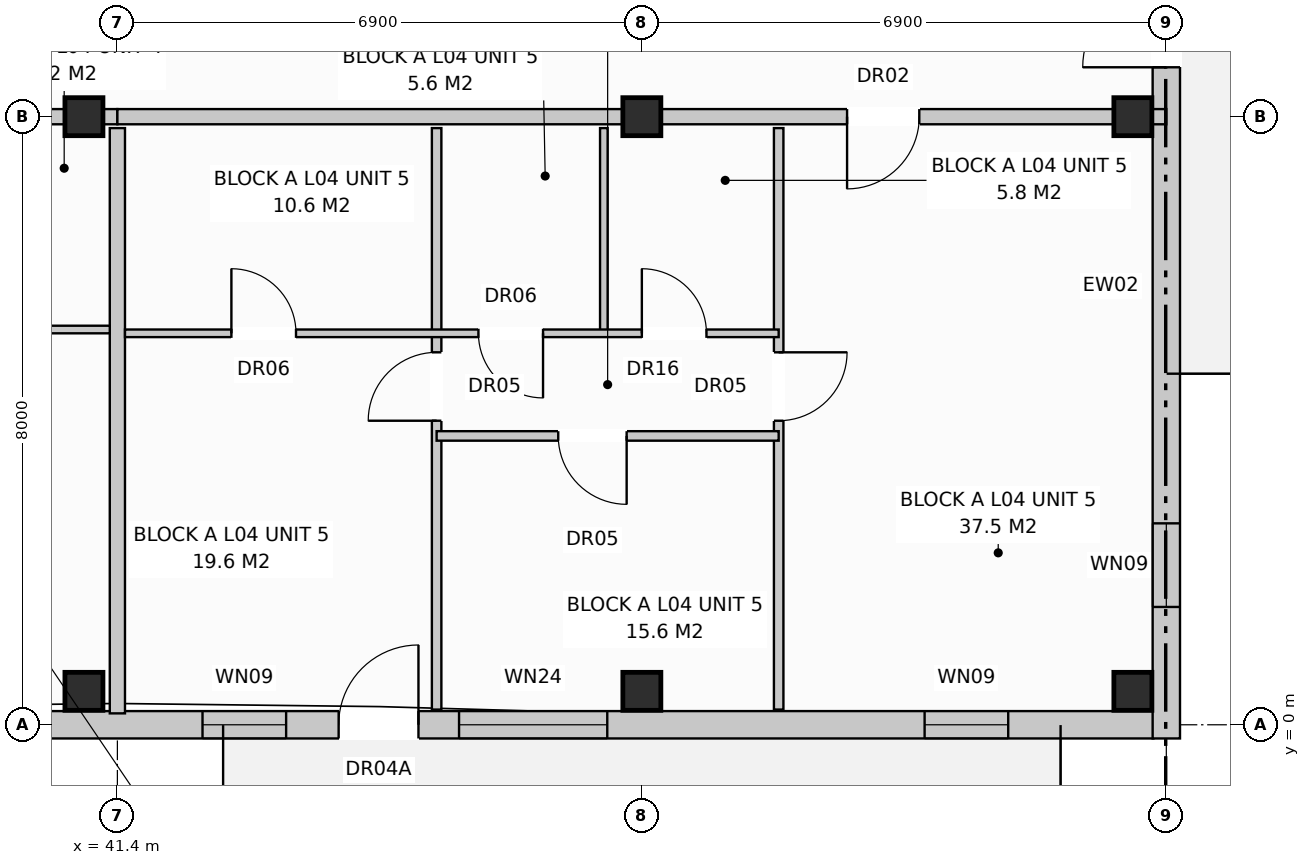
"""IFC4 building model, lengths in metres.
Left out: names, types, materials, properties, quantities, classifications, styles, units other than length and angle.
Written with IfcOpenShell. Run it as: python <this file> out.ifc"""

import sys

from ifc_helpers import new_model, si_unit, direction, frame, frame_2d, origin, origin_with_axes, origin_2d, place, context, subcontext, project, spatial, rectangle, extrude, element, fill, save


model = new_model("IFC4")
c1 = context("Model", 3, precision=1e-05, world=origin(), true_north=direction((0.0, 1.0)))
c2 = subcontext(c1, "Body", "Model", "MODEL_VIEW")
j1 = project(units=[si_unit("LENGTHUNIT", "METRE"), si_unit("PLANEANGLEUNIT", "RADIAN")], contexts=[c1])
p1 = place(None, origin())
s1 = spatial("IfcSite", under=j1, at=p1, CompositionType="ELEMENT")
p2 = place(p1, origin())
s2 = spatial("IfcBuilding", under=s1, at=p2, CompositionType="ELEMENT")
p3 = place(p2, frame((0.0, 0.0, 14.4)))
s3 = spatial("IfcBuildingStorey", under=s2, at=p3, CompositionType="ELEMENT", Elevation=14.4)
for number, where, z_axis, x_axis in (
    (1, (40.96, 0.44, 0.0), (0.0, 0.0, 1.0), (1.0, 0.0, 0.0)),
    (2, (40.96, 8.0, 0.0), (0.0, 0.0, 1.0), (1.0, 0.0, 0.0)),
    (3, (48.3, 0.44, 0.0), (0.0, 0.0, 1.0), (1.0, 0.0, 0.0)),
    (4, (48.3, 8.0, 0.0), (0.0, 0.0, 1.0), (1.0, 0.0, 0.0)),
    (5, (54.76, 0.44, 0.0), (0.0, 0.0, 1.0), (1.0, 0.0, 0.0)),
    (6, (54.76, 8.0, 0.0), (0.0, 0.0, 1.0), (1.0, 0.0, 0.0)),
):
    element("IfcColumn", number, at=place(p3, frame(where, z_axis=z_axis, x_axis=x_axis)), inside=s3, PredefinedType="COLUMN", context=c2, shape_type="SweptSolid", body=[
        extrude(rectangle(XDim=0.5, YDim=0.5, at=origin_2d()), origin(), (0.0, 0.0, 1.0), 3.2),
    ])
p4 = place(p3, frame((0.17, 0.0, 0.0), z_axis=(0.0, 0.0, 1.0), x_axis=(1.0, 0.0, 0.0)))
e7 = element("IfcWall", 7, at=p4, inside=s3, PredefinedType="STANDARD", context=c2, shape_type="SweptSolid", body=[
    extrude(rectangle(XDim=54.86, YDim=0.36, at=frame_2d((27.43, 0.0))), origin(), (0.0, 0.0, 1.0), 2.94),
])
p5 = place(p4, frame((2.485, 0.0, 0.0)))
e8 = element("IfcOpeningElement", 8, at=p5, cuts=e7, PredefinedType="OPENING", context=c2, shape_type="SweptSolid", body=[
    extrude(rectangle(XDim=1.05, YDim=2.12, at=frame_2d((0.525, 1.06))), frame((0.0, 0.192, 0.0), z_axis=(0.0, -1.0, 0.0), x_axis=(1.0, 0.0, 0.0)), (0.0, 0.0, 1.0), 0.384),
])
p6 = place(p4, frame((16.985, 0.0, 0.0)))
e9 = element("IfcOpeningElement", 9, at=p6, cuts=e7, PredefinedType="OPENING", context=c2, shape_type="SweptSolid", body=[
    extrude(rectangle(XDim=1.05, YDim=2.12, at=frame_2d((0.525, 1.06))), frame((0.0, 0.192, 0.0), z_axis=(0.0, -1.0, 0.0), x_axis=(1.0, 0.0, 0.0)), (0.0, 0.0, 1.0), 0.384),
])
p7 = place(p4, frame((30.085, 0.0, 0.0)))
e10 = element("IfcOpeningElement", 10, at=p7, cuts=e7, PredefinedType="OPENING", context=c2, shape_type="SweptSolid", body=[
    extrude(rectangle(XDim=1.05, YDim=2.12, at=frame_2d((0.525, 1.06))), frame((0.0, 0.192, 0.0), z_axis=(0.0, -1.0, 0.0), x_axis=(1.0, 0.0, 0.0)), (0.0, 0.0, 1.0), 0.384),
])
p8 = place(p4, frame((44.141, 0.0, 0.0)))
e11 = element("IfcOpeningElement", 11, at=p8, cuts=e7, PredefinedType="OPENING", context=c2, shape_type="SweptSolid", body=[
    extrude(rectangle(XDim=1.05, YDim=2.12, at=frame_2d((0.525, 1.06))), frame((0.0, 0.192, 0.0), z_axis=(0.0, -1.0, 0.0), x_axis=(1.0, 0.0, 0.0)), (0.0, 0.0, 1.0), 0.384),
])
p9 = place(p4, frame((0.75, 0.0, 0.72)))
e12 = element("IfcOpeningElement", 12, at=p9, cuts=e7, PredefinedType="OPENING", context=c2, shape_type="SweptSolid", body=[
    extrude(rectangle(XDim=1.1, YDim=1.5, at=frame_2d((0.55, 0.75))), frame((0.0, 0.192, 0.0), z_axis=(0.0, -1.0, 0.0), x_axis=(1.0, 0.0, 0.0)), (0.0, 0.0, 1.0), 0.384),
])
p10 = place(p4, frame((4.25, 0.0, 0.72)))
e13 = element("IfcOpeningElement", 13, at=p10, cuts=e7, PredefinedType="OPENING", context=c2, shape_type="SweptSolid", body=[
    extrude(rectangle(XDim=1.9, YDim=1.85, at=frame_2d((0.95, 0.925))), frame((0.0, 0.192, 0.0), z_axis=(0.0, -1.0, 0.0), x_axis=(1.0, 0.0, 0.0)), (0.0, 0.0, 1.0), 0.384),
])
p11 = place(p4, frame((8.925, 0.0, 0.8)))
e14 = element("IfcOpeningElement", 14, at=p11, cuts=e7, PredefinedType="OPENING", context=c2, shape_type="SweptSolid", body=[
    extrude(rectangle(XDim=1.95, YDim=1.65, at=frame_2d((0.975, 0.825))), frame((0.0, 0.192, 0.0), z_axis=(0.0, -1.0, 0.0), x_axis=(1.0, 0.0, 0.0)), (0.0, 0.0, 1.0), 0.384),
])
p12 = place(p4, frame((15.05, 0.0, 0.72)))
e15 = element("IfcOpeningElement", 15, at=p12, cuts=e7, PredefinedType="OPENING", context=c2, shape_type="SweptSolid", body=[
    extrude(rectangle(XDim=1.1, YDim=1.5, at=frame_2d((0.55, 0.75))), frame((0.0, 0.192, 0.0), z_axis=(0.0, -1.0, 0.0), x_axis=(1.0, 0.0, 0.0)), (0.0, 0.0, 1.0), 0.384),
])
p13 = place(p4, frame((21.05, 0.0, 0.72)))
e16 = element("IfcOpeningElement", 16, at=p13, cuts=e7, PredefinedType="OPENING", context=c2, shape_type="SweptSolid", body=[
    extrude(rectangle(XDim=1.9, YDim=1.85, at=frame_2d((0.95, 0.925))), frame((0.0, 0.192, 0.0), z_axis=(0.0, -1.0, 0.0), x_axis=(1.0, 0.0, 0.0)), (0.0, 0.0, 1.0), 0.384),
])
p14 = place(p4, frame((24.85, 0.0, 0.72)))
e17 = element("IfcOpeningElement", 17, at=p14, cuts=e7, PredefinedType="OPENING", context=c2, shape_type="SweptSolid", body=[
    extrude(rectangle(XDim=1.1, YDim=1.5, at=frame_2d((0.55, 0.75))), frame((0.0, 0.192, 0.0), z_axis=(0.0, -1.0, 0.0), x_axis=(1.0, 0.0, 0.0)), (0.0, 0.0, 1.0), 0.384),
])
p15 = place(p4, frame((28.35, 0.0, 0.72)))
e18 = element("IfcOpeningElement", 18, at=p15, cuts=e7, PredefinedType="OPENING", context=c2, shape_type="SweptSolid", body=[
    extrude(rectangle(XDim=1.1, YDim=1.5, at=frame_2d((0.55, 0.75))), frame((0.0, 0.192, 0.0), z_axis=(0.0, -1.0, 0.0), x_axis=(1.0, 0.0, 0.0)), (0.0, 0.0, 1.0), 0.384),
])
p16 = place(p4, frame((31.85, 0.0, 0.72)))
e19 = element("IfcOpeningElement", 19, at=p16, cuts=e7, PredefinedType="OPENING", context=c2, shape_type="SweptSolid", body=[
    extrude(rectangle(XDim=1.9, YDim=1.85, at=frame_2d((0.95, 0.925))), frame((0.0, 0.192, 0.0), z_axis=(0.0, -1.0, 0.0), x_axis=(1.0, 0.0, 0.0)), (0.0, 0.0, 1.0), 0.384),
])
p17 = place(p4, frame((35.525, 0.0, 0.8)))
e20 = element("IfcOpeningElement", 20, at=p17, cuts=e7, PredefinedType="OPENING", context=c2, shape_type="SweptSolid", body=[
    extrude(rectangle(XDim=1.95, YDim=1.65, at=frame_2d((0.975, 0.825))), frame((0.0, 0.192, 0.0), z_axis=(0.0, -1.0, 0.0), x_axis=(1.0, 0.0, 0.0)), (0.0, 0.0, 1.0), 0.384),
])
p18 = place(p4, frame((39.25, 0.0, 0.72)))
e21 = element("IfcOpeningElement", 21, at=p18, cuts=e7, PredefinedType="OPENING", context=c2, shape_type="SweptSolid", body=[
    extrude(rectangle(XDim=1.1, YDim=1.5, at=frame_2d((0.55, 0.75))), frame((0.0, 0.192, 0.0), z_axis=(0.0, -1.0, 0.0), x_axis=(1.0, 0.0, 0.0)), (0.0, 0.0, 1.0), 0.384),
])
p19 = place(p4, frame((42.35, 0.0, 0.72)))
e22 = element("IfcOpeningElement", 22, at=p19, cuts=e7, PredefinedType="OPENING", context=c2, shape_type="SweptSolid", body=[
    extrude(rectangle(XDim=1.1, YDim=1.5, at=frame_2d((0.55, 0.75))), frame((0.0, 0.192, 0.0), z_axis=(0.0, -1.0, 0.0), x_axis=(1.0, 0.0, 0.0)), (0.0, 0.0, 1.0), 0.384),
])
p20 = place(p4, frame((45.725, 0.0, 0.8)))
e23 = element("IfcOpeningElement", 23, at=p20, cuts=e7, PredefinedType="OPENING", context=c2, shape_type="SweptSolid", body=[
    extrude(rectangle(XDim=1.95, YDim=1.65, at=frame_2d((0.975, 0.825))), frame((0.0, 0.192, 0.0), z_axis=(0.0, -1.0, 0.0), x_axis=(1.0, 0.0, 0.0)), (0.0, 0.0, 1.0), 0.384),
])
p21 = place(p4, frame((51.85, 0.0, 0.72)))
e24 = element("IfcOpeningElement", 24, at=p21, cuts=e7, PredefinedType="OPENING", context=c2, shape_type="SweptSolid", body=[
    extrude(rectangle(XDim=1.1, YDim=1.5, at=frame_2d((0.55, 0.75))), frame((0.0, 0.192, 0.0), z_axis=(0.0, -1.0, 0.0), x_axis=(1.0, 0.0, 0.0)), (0.0, 0.0, 1.0), 0.384),
])
p22 = place(p3, frame((55.2, -0.18, 0.0), z_axis=(0.0, 0.0, 1.0), x_axis=(0.0, 1.0, 0.0)))
e25 = element("IfcWall", 25, at=p22, inside=s3, PredefinedType="STANDARD", context=c2, shape_type="SweptSolid", body=[
    extrude(rectangle(XDim=18.76, YDim=0.36, at=frame_2d((9.38, 0.0))), origin(), (0.0, 0.0, 1.0), 2.94),
])
p23 = place(p22, frame((8.83, 0.0, 0.0)))
e26 = element("IfcOpeningElement", 26, at=p23, cuts=e25, PredefinedType="OPENING", context=c2, shape_type="SweptSolid", body=[
    extrude(rectangle(XDim=1.1, YDim=2.1, at=frame_2d((0.55, 1.05))), frame((0.0, 0.192, 0.0), z_axis=(0.0, -1.0, 0.0), x_axis=(1.0, 0.0, 0.0)), (0.0, 0.0, 1.0), 0.384),
])
p24 = place(p22, frame((1.73, 0.0, 0.72)))
e27 = element("IfcOpeningElement", 27, at=p24, cuts=e25, PredefinedType="OPENING", context=c2, shape_type="SweptSolid", body=[
    extrude(rectangle(XDim=1.1, YDim=1.5, at=frame_2d((0.55, 0.75))), frame((0.0, 0.192, 0.0), z_axis=(0.0, -1.0, 0.0), x_axis=(1.0, 0.0, 0.0)), (0.0, 0.0, 1.0), 0.384),
])
p25 = place(p22, frame((15.93, 0.0, 0.72)))
e28 = element("IfcOpeningElement", 28, at=p25, cuts=e25, PredefinedType="OPENING", context=c2, shape_type="SweptSolid", body=[
    extrude(rectangle(XDim=1.1, YDim=1.5, at=frame_2d((0.55, 0.75))), frame((0.0, 0.192, 0.0), z_axis=(0.0, -1.0, 0.0), x_axis=(1.0, 0.0, 0.0)), (0.0, 0.0, 1.0), 0.384),
])
p26 = place(p3, frame((41.4, 7.85, 0.0), z_axis=(0.0, 0.0, 1.0), x_axis=(0.0, -1.0, 0.0)))
e29 = element("IfcWall", 29, at=p26, inside=s3, PredefinedType="PARTITIONING", context=c2, shape_type="SweptSolid", body=[
    extrude(rectangle(XDim=7.7, YDim=0.2, at=frame_2d((3.85, 0.0))), origin(), (0.0, 0.0, 1.0), 2.94),
])
p27 = place(p3, frame((34.5, 8.0, 0.0), z_axis=(0.0, 0.0, 1.0), x_axis=(1.0, 0.0, 0.0)))
e30 = element("IfcWall", 30, at=p27, inside=s3, PredefinedType="PARTITIONING", context=c2, shape_type="SweptSolid", body=[
    extrude(rectangle(XDim=6.9, YDim=0.2, at=frame_2d((3.45, 0.0))), origin(), (0.0, 0.0, 1.0), 2.38),
])
p28 = place(p27, frame((2.0, 0.0, 0.0)))
e31 = element("IfcOpeningElement", 31, at=p28, cuts=e30, PredefinedType="OPENING", context=c2, shape_type="SweptSolid", body=[
    extrude(rectangle(XDim=0.95, YDim=2.15, at=frame_2d((0.475, 1.075))), frame((0.0, 0.112, 0.0), z_axis=(0.0, -1.0, 0.0), x_axis=(1.0, 0.0, 0.0)), (0.0, 0.0, 1.0), 0.224),
])
p29 = place(p3, frame((38.8, 5.2, 0.0), z_axis=(0.0, 0.0, 1.0), x_axis=(1.0, 0.0, 0.0)))
e32 = element("IfcWall", 32, at=p29, inside=s3, PredefinedType="PARTITIONING", context=c2, shape_type="SweptSolid", body=[
    extrude(rectangle(XDim=2.5, YDim=0.1, at=frame_2d((1.25, 0.0))), origin(), (0.0, 0.0, 1.0), 2.94),
])
p30 = place(p3, frame((41.4, 8.0, 0.0), z_axis=(0.0, 0.0, 1.0), x_axis=(1.0, 0.0, 0.0)))
e33 = element("IfcWall", 33, at=p30, inside=s3, PredefinedType="PARTITIONING", context=c2, shape_type="SweptSolid", body=[
    extrude(rectangle(XDim=13.8, YDim=0.2, at=frame_2d((6.9, 0.0))), origin(), (0.0, 0.0, 1.0), 2.38),
])
p31 = place(p30, frame((9.6, 0.0, 0.0)))
e34 = element("IfcOpeningElement", 34, at=p31, cuts=e33, PredefinedType="OPENING", context=c2, shape_type="SweptSolid", body=[
    extrude(rectangle(XDim=0.95, YDim=2.15, at=frame_2d((0.475, 1.075))), frame((0.0, 0.112, 0.0), z_axis=(0.0, -1.0, 0.0), x_axis=(1.0, 0.0, 0.0)), (0.0, 0.0, 1.0), 0.224),
])
p32 = place(p3, frame((50.1, 7.85, 0.0), z_axis=(0.0, 0.0, 1.0), x_axis=(0.0, -1.0, 0.0)))
e35 = element("IfcWall", 35, at=p32, inside=s3, PredefinedType="PARTITIONING", context=c2, shape_type="SweptSolid", body=[
    extrude(rectangle(XDim=7.65, YDim=0.125, at=frame_2d((3.825, 0.0))), origin(), (0.0, 0.0, 1.0), 2.94),
])
p33 = place(p32, frame((2.95, 0.0, 0.0)))
e36 = element("IfcOpeningElement", 36, at=p33, cuts=e35, PredefinedType="OPENING", context=c2, shape_type="SweptSolid", body=[
    extrude(rectangle(XDim=0.9, YDim=2.1, at=frame_2d((0.45, 1.05))), frame((0.0, 0.074, 0.0), z_axis=(0.0, -1.0, 0.0), x_axis=(1.0, 0.0, 0.0)), (0.0, 0.0, 1.0), 0.149),
])
p34 = place(p3, frame((45.6, 7.85, 0.0), z_axis=(0.0, 0.0, 1.0), x_axis=(0.0, -1.0, 0.0)))
e37 = element("IfcWall", 37, at=p34, inside=s3, PredefinedType="PARTITIONING", context=c2, shape_type="SweptSolid", body=[
    extrude(rectangle(XDim=7.65, YDim=0.125, at=frame_2d((3.825, 0.0))), origin(), (0.0, 0.0, 1.0), 2.94),
])
p35 = place(p34, frame((2.95, 0.0, 0.0)))
e38 = element("IfcOpeningElement", 38, at=p35, cuts=e37, PredefinedType="OPENING", context=c2, shape_type="SweptSolid", body=[
    extrude(rectangle(XDim=0.9, YDim=2.1, at=frame_2d((0.45, 1.05))), frame((0.0, 0.074, 0.0), z_axis=(0.0, -1.0, 0.0), x_axis=(1.0, 0.0, 0.0)), (0.0, 0.0, 1.0), 0.149),
])
p36 = place(p3, frame((47.8, 7.85, 0.0), z_axis=(0.0, 0.0, 1.0), x_axis=(0.0, -1.0, 0.0)))
e39 = element("IfcWall", 39, at=p36, inside=s3, PredefinedType="PARTITIONING", context=c2, shape_type="SweptSolid", body=[
    extrude(rectangle(XDim=2.7, YDim=0.1, at=frame_2d((1.35, 0.0))), origin(), (0.0, 0.0, 1.0), 2.94),
])
p37 = place(p3, frame((41.5, 5.15, 0.0), z_axis=(0.0, 0.0, 1.0), x_axis=(1.0, 0.0, 0.0)))
e40 = element("IfcWall", 40, at=p37, inside=s3, PredefinedType="PARTITIONING", context=c2, shape_type="SweptSolid", body=[
    extrude(rectangle(XDim=8.6, YDim=0.1, at=frame_2d((4.3, 0.0))), origin(), (0.0, 0.0, 1.0), 2.94),
])
p38 = place(p37, frame((1.4, 0.0, 0.0)))
e41 = element("IfcOpeningElement", 41, at=p38, cuts=e40, PredefinedType="OPENING", context=c2, shape_type="SweptSolid", body=[
    extrude(rectangle(XDim=0.85, YDim=2.05, at=frame_2d((0.425, 1.025))), frame((0.0, 0.062, 0.0), z_axis=(0.0, -1.0, 0.0), x_axis=(1.0, 0.0, 0.0)), (0.0, 0.0, 1.0), 0.124),
])
p39 = place(p37, frame((4.65, 0.0, 0.0)))
e42 = element("IfcOpeningElement", 42, at=p39, cuts=e40, PredefinedType="OPENING", context=c2, shape_type="SweptSolid", body=[
    extrude(rectangle(XDim=0.85, YDim=2.05, at=frame_2d((0.425, 1.025))), frame((0.0, 0.062, 0.0), z_axis=(0.0, -1.0, 0.0), x_axis=(1.0, 0.0, 0.0)), (0.0, 0.0, 1.0), 0.124),
])
p40 = place(p37, frame((6.8, 0.0, 0.0)))
e43 = element("IfcOpeningElement", 43, at=p40, cuts=e40, PredefinedType="OPENING", context=c2, shape_type="SweptSolid", body=[
    extrude(rectangle(XDim=0.85, YDim=2.1, at=frame_2d((0.425, 1.05))), frame((0.0, 0.062, 0.0), z_axis=(0.0, -1.0, 0.0), x_axis=(1.0, 0.0, 0.0)), (0.0, 0.0, 1.0), 0.124),
])
p41 = place(p3, frame((45.6, 3.8, 0.0), z_axis=(0.0, 0.0, 1.0), x_axis=(1.0, 0.0, 0.0)))
e44 = element("IfcWall", 44, at=p41, inside=s3, PredefinedType="PARTITIONING", context=c2, shape_type="SweptSolid", body=[
    extrude(rectangle(XDim=4.5, YDim=0.125, at=frame_2d((2.25, 0.0))), origin(), (0.0, 0.0, 1.0), 2.94),
])
p42 = place(p41, frame((1.6, 0.0, 0.0)))
e45 = element("IfcOpeningElement", 45, at=p42, cuts=e44, PredefinedType="OPENING", context=c2, shape_type="SweptSolid", body=[
    extrude(rectangle(XDim=0.9, YDim=2.1, at=frame_2d((0.45, 1.05))), frame((0.0, 0.074, 0.0), z_axis=(0.0, -1.0, 0.0), x_axis=(1.0, 0.0, 0.0)), (0.0, 0.0, 1.0), 0.149),
])
p43 = place(p8, origin_with_axes())
e46 = element("IfcDoor", 46, at=p43, inside=s3, OperationType="SINGLE_SWING_RIGHT", PredefinedType="DOOR", context=c2, shape_type="SweptSolid", body=[
    extrude(rectangle(XDim=1.05, YDim=2.12, at=frame_2d((0.525, 1.06))), frame((0.0, 0.025, 0.0), z_axis=(0.0, -1.0, 0.0), x_axis=(1.0, 0.0, 0.0)), (0.0, 0.0, 1.0), 0.05),
])
fill(e11, e46)
p44 = place(p19, origin_with_axes())
e47 = element("IfcWindow", 47, at=p44, inside=s3, PartitioningType="SINGLE_PANEL", PredefinedType="WINDOW", context=c2, shape_type="SweptSolid", body=[
    extrude(rectangle(XDim=1.1, YDim=1.5, at=frame_2d((0.55, 0.75))), frame((0.0, 0.03, 0.0), z_axis=(0.0, -1.0, 0.0), x_axis=(1.0, 0.0, 0.0)), (0.0, 0.0, 1.0), 0.06),
])
fill(e22, e47)
p45 = place(p20, origin_with_axes())
e48 = element("IfcWindow", 48, at=p45, inside=s3, PartitioningType="SINGLE_PANEL", PredefinedType="WINDOW", context=c2, shape_type="SweptSolid", body=[
    extrude(rectangle(XDim=1.95, YDim=1.65, at=frame_2d((0.975, 0.825))), frame((0.0, 0.03, 0.0), z_axis=(0.0, -1.0, 0.0), x_axis=(1.0, 0.0, 0.0)), (0.0, 0.0, 1.0), 0.06),
])
fill(e23, e48)
p46 = place(p21, origin_with_axes())
e49 = element("IfcWindow", 49, at=p46, inside=s3, PartitioningType="SINGLE_PANEL", PredefinedType="WINDOW", context=c2, shape_type="SweptSolid", body=[
    extrude(rectangle(XDim=1.1, YDim=1.5, at=frame_2d((0.55, 0.75))), frame((0.0, 0.03, 0.0), z_axis=(0.0, -1.0, 0.0), x_axis=(1.0, 0.0, 0.0)), (0.0, 0.0, 1.0), 0.06),
])
fill(e24, e49)
p47 = place(p23, origin_with_axes())
e50 = element("IfcDoor", 50, at=p47, inside=s3, OperationType="SINGLE_SWING_LEFT", PredefinedType="DOOR", context=c2, shape_type="SweptSolid", body=[
    extrude(rectangle(XDim=1.1, YDim=2.1, at=frame_2d((0.55, 1.05))), frame((0.0, 0.025, 0.0), z_axis=(0.0, -1.0, 0.0), x_axis=(1.0, 0.0, 0.0)), (0.0, 0.0, 1.0), 0.05),
])
fill(e26, e50)
p48 = place(p24, origin_with_axes())
e51 = element("IfcWindow", 51, at=p48, inside=s3, PartitioningType="SINGLE_PANEL", PredefinedType="WINDOW", context=c2, shape_type="SweptSolid", body=[
    extrude(rectangle(XDim=1.1, YDim=1.5, at=frame_2d((0.55, 0.75))), frame((0.0, 0.03, 0.0), z_axis=(0.0, -1.0, 0.0), x_axis=(1.0, 0.0, 0.0)), (0.0, 0.0, 1.0), 0.06),
])
fill(e27, e51)
p49 = place(p31, frame((0.95, 0.0, 0.0), z_axis=(0.0, 0.0, 1.0), x_axis=(-1.0, 0.0, 0.0)))
e52 = element("IfcDoor", 52, at=p49, inside=s3, OperationType="SINGLE_SWING_LEFT", PredefinedType="DOOR", context=c2, shape_type="SweptSolid", body=[
    extrude(rectangle(XDim=0.95, YDim=2.15, at=frame_2d((0.475, 1.075))), frame((0.0, 0.025, 0.0), z_axis=(0.0, -1.0, 0.0), x_axis=(1.0, 0.0, 0.0)), (0.0, 0.0, 1.0), 0.05),
])
fill(e34, e52)
p50 = place(p33, origin_with_axes())
e53 = element("IfcDoor", 53, at=p50, inside=s3, OperationType="SINGLE_SWING_LEFT", PredefinedType="DOOR", context=c2, shape_type="SweptSolid", body=[
    extrude(rectangle(XDim=0.9, YDim=2.1, at=frame_2d((0.45, 1.05))), frame((0.0, 0.025, 0.0), z_axis=(0.0, -1.0, 0.0), x_axis=(1.0, 0.0, 0.0)), (0.0, 0.0, 1.0), 0.05),
])
fill(e36, e53)
p51 = place(p35, frame((0.9, 0.0, 0.0), z_axis=(0.0, 0.0, 1.0), x_axis=(-1.0, 0.0, 0.0)))
e54 = element("IfcDoor", 54, at=p51, inside=s3, OperationType="SINGLE_SWING_RIGHT", PredefinedType="DOOR", context=c2, shape_type="SweptSolid", body=[
    extrude(rectangle(XDim=0.9, YDim=2.1, at=frame_2d((0.45, 1.05))), frame((0.0, 0.025, 0.0), z_axis=(0.0, -1.0, 0.0), x_axis=(1.0, 0.0, 0.0)), (0.0, 0.0, 1.0), 0.05),
])
fill(e38, e54)
p52 = place(p38, origin_with_axes())
e55 = element("IfcDoor", 55, at=p52, inside=s3, OperationType="SINGLE_SWING_LEFT", PredefinedType="DOOR", context=c2, shape_type="SweptSolid", body=[
    extrude(rectangle(XDim=0.85, YDim=2.05, at=frame_2d((0.425, 1.025))), frame((0.0, 0.025, 0.0), z_axis=(0.0, -1.0, 0.0), x_axis=(1.0, 0.0, 0.0)), (0.0, 0.0, 1.0), 0.05),
])
fill(e41, e55)
p53 = place(p39, frame((0.85, 0.0, 0.0), z_axis=(0.0, 0.0, 1.0), x_axis=(-1.0, 0.0, 0.0)))
e56 = element("IfcDoor", 56, at=p53, inside=s3, OperationType="SINGLE_SWING_RIGHT", PredefinedType="DOOR", context=c2, shape_type="SweptSolid", body=[
    extrude(rectangle(XDim=0.85, YDim=2.05, at=frame_2d((0.425, 1.025))), frame((0.0, 0.025, 0.0), z_axis=(0.0, -1.0, 0.0), x_axis=(1.0, 0.0, 0.0)), (0.0, 0.0, 1.0), 0.05),
])
fill(e42, e56)
p54 = place(p40, origin_with_axes())
e57 = element("IfcDoor", 57, at=p54, inside=s3, OperationType="SINGLE_SWING_LEFT", PredefinedType="DOOR", context=c2, shape_type="SweptSolid", body=[
    extrude(rectangle(XDim=0.85, YDim=2.1, at=frame_2d((0.425, 1.05))), frame((0.0, 0.025, 0.0), z_axis=(0.0, -1.0, 0.0), x_axis=(1.0, 0.0, 0.0)), (0.0, 0.0, 1.0), 0.05),
])
fill(e43, e57)
p55 = place(p42, frame((0.9, 0.0, 0.0), z_axis=(0.0, 0.0, 1.0), x_axis=(-1.0, 0.0, 0.0)))
e58 = element("IfcDoor", 58, at=p55, inside=s3, OperationType="SINGLE_SWING_RIGHT", PredefinedType="DOOR", context=c2, shape_type="SweptSolid", body=[
    extrude(rectangle(XDim=0.9, YDim=2.1, at=frame_2d((0.45, 1.05))), frame((0.0, 0.025, 0.0), z_axis=(0.0, -1.0, 0.0), x_axis=(1.0, 0.0, 0.0)), (0.0, 0.0, 1.0), 0.05),
])
fill(e45, e58)
save(model, sys.argv[1])
